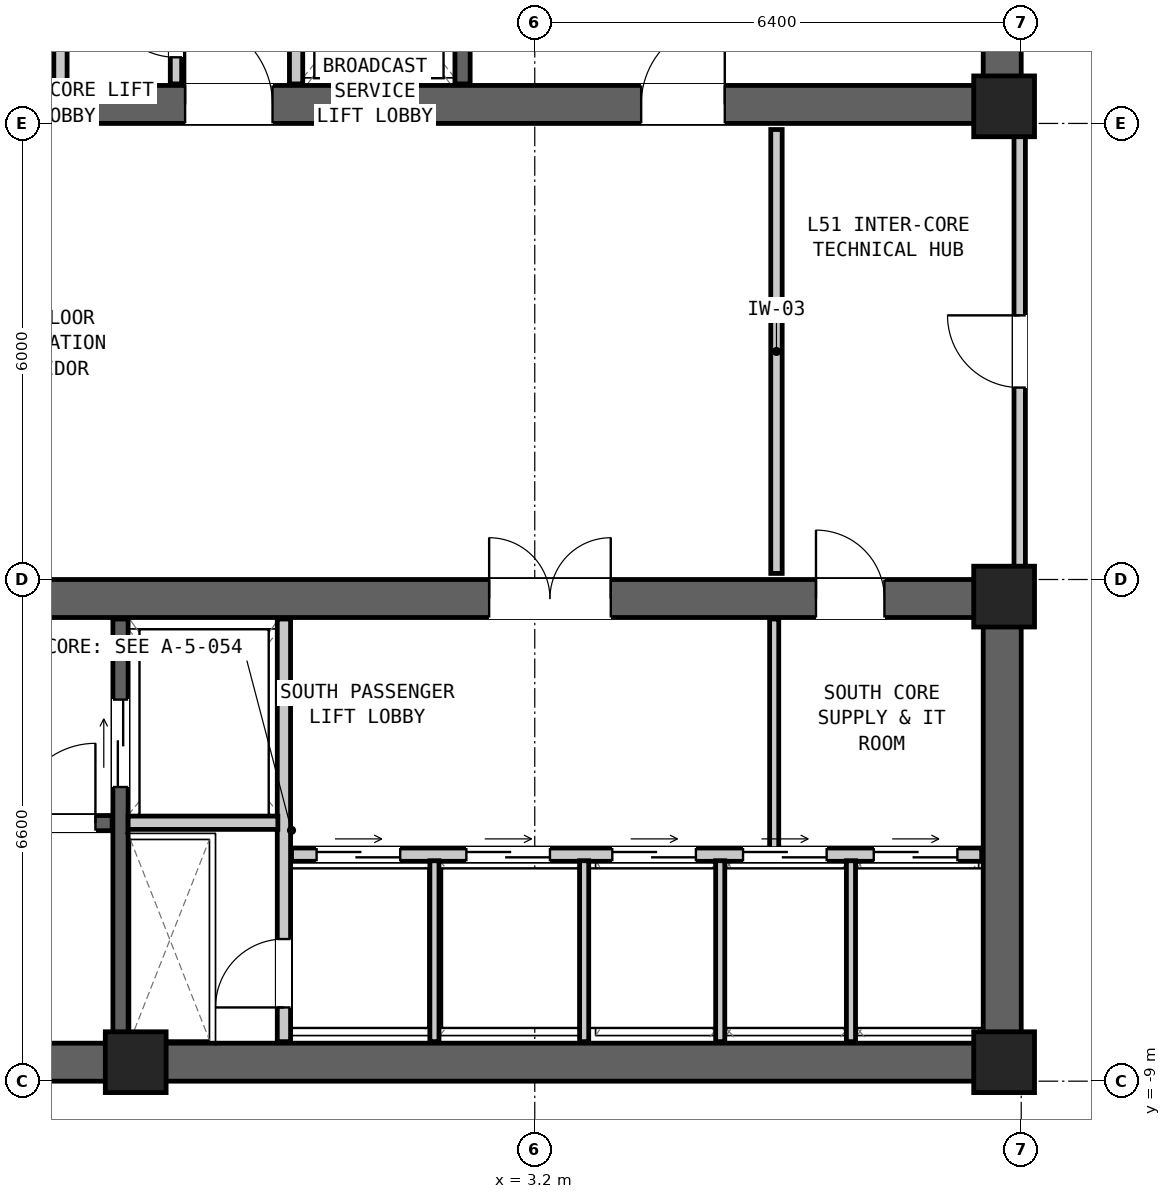
"""IFC4 building model, lengths in metres.
Left out: names, types, materials, properties, quantities, classifications, styles, units other than length and angle.
Written with IfcOpenShell. Run it as: python <this file> out.ifc"""

import sys

from ifc_helpers import new_model, si_unit, direction, frame, frame_2d, origin, origin_2d, place, context, subcontext, project, spatial, rectangle, extrude, element, fill, save


model = new_model("IFC4")
c1 = context("Model", 3, precision=1e-05, world=origin(), true_north=direction((0.0, 1.0)))
c2 = subcontext(c1, "Body", "Model", "MODEL_VIEW")
j1 = project(units=[si_unit("LENGTHUNIT", "METRE"), si_unit("PLANEANGLEUNIT", "RADIAN")], contexts=[c1])
p1 = place(None, origin())
s1 = spatial("IfcSite", under=j1, at=p1, CompositionType="ELEMENT")
p2 = place(p1, origin())
s2 = spatial("IfcBuilding", under=s1, at=p2, CompositionType="ELEMENT")
p3 = place(p2, frame((0.0, 0.0, 174.45)))
s3 = spatial("IfcBuildingStorey", under=s2, at=p3, CompositionType="ELEMENT", Elevation=174.45)
p4 = place(p3, frame((-9.6, 3.85, 0.0), z_axis=(0.0, 0.0, 1.0), x_axis=(1.0, 0.0, 0.0)))
e1 = element("IfcWall", 1, at=p4, inside=s3, PredefinedType="SHEAR", context=c2, shape_type="SweptSolid", body=[
    extrude(rectangle(XDim=19.2, YDim=0.5, at=frame_2d((9.6, 0.0))), origin(), (0.0, 0.0, 1.0), 3.05),
])
p5 = place(p4, frame((14.2, 0.0, 0.0)))
e2 = element("IfcOpeningElement", 2, at=p5, cuts=e1, PredefinedType="OPENING", context=c2, shape_type="SweptSolid", body=[
    extrude(rectangle(XDim=1.1, YDim=2.08, at=frame_2d((0.55, 1.04))), frame((0.0, 0.262, 0.0), z_axis=(0.0, -1.0, 0.0), x_axis=(1.0, 0.0, 0.0)), (0.0, 0.0, 1.0), 0.524),
])
p6 = place(p4, frame((8.2, 0.0, 0.0)))
e3 = element("IfcOpeningElement", 3, at=p6, cuts=e1, PredefinedType="OPENING", context=c2, shape_type="SweptSolid", body=[
    extrude(rectangle(XDim=1.15, YDim=2.1, at=frame_2d((0.575, 1.05))), frame((0.0, 0.262, 0.0), z_axis=(0.0, -1.0, 0.0), x_axis=(1.0, 0.0, 0.0)), (0.0, 0.0, 1.0), 0.524),
])
p7 = place(p4, frame((2.5, 0.0, 0.0)))
e4 = element("IfcOpeningElement", 4, at=p7, cuts=e1, PredefinedType="OPENING", context=c2, shape_type="SweptSolid", body=[
    extrude(rectangle(XDim=1.6, YDim=2.12, at=frame_2d((0.8, 1.06))), frame((0.0, 0.262, 0.0), z_axis=(0.0, -1.0, 0.0), x_axis=(1.0, 0.0, 0.0)), (0.0, 0.0, 1.0), 0.524),
])
p8 = place(p3, frame((9.35, 3.6, 0.0), z_axis=(0.0, 0.0, 1.0), x_axis=(0.0, 1.0, 0.0)))
e5 = element("IfcWall", 5, at=p8, inside=s3, PredefinedType="SHEAR", context=c2, shape_type="SweptSolid", body=[
    extrude(rectangle(XDim=6.6, YDim=0.5, at=frame_2d((3.3, 0.0))), origin(), (0.0, 0.0, 1.0), 3.05),
])
p9 = place(p3, frame((-9.6, -8.75, 0.0), z_axis=(0.0, 0.0, 1.0), x_axis=(1.0, 0.0, 0.0)))
e6 = element("IfcWall", 6, at=p9, inside=s3, PredefinedType="SHEAR", context=c2, shape_type="SweptSolid", body=[
    extrude(rectangle(XDim=19.2, YDim=0.5, at=frame_2d((9.6, 0.0))), origin(), (0.0, 0.0, 1.0), 3.05),
])
p10 = place(p3, frame((-9.6, -2.65, 0.0), z_axis=(0.0, 0.0, 1.0), x_axis=(1.0, 0.0, 0.0)))
e7 = element("IfcWall", 7, at=p10, inside=s3, PredefinedType="SHEAR", context=c2, shape_type="SweptSolid", body=[
    extrude(rectangle(XDim=19.2, YDim=0.5, at=frame_2d((9.6, 0.0))), origin(), (0.0, 0.0, 1.0), 3.05),
])
p11 = place(p10, frame((3.8, 0.0, 0.0)))
e8 = element("IfcOpeningElement", 8, at=p11, cuts=e7, PredefinedType="OPENING", context=c2, shape_type="SweptSolid", body=[
    extrude(rectangle(XDim=1.1, YDim=2.08, at=frame_2d((0.55, 1.04))), frame((0.0, 0.262, 0.0), z_axis=(0.0, -1.0, 0.0), x_axis=(1.0, 0.0, 0.0)), (0.0, 0.0, 1.0), 0.524),
])
p12 = place(p10, frame((12.2, 0.0, 0.0)))
e9 = element("IfcOpeningElement", 9, at=p12, cuts=e7, PredefinedType="OPENING", context=c2, shape_type="SweptSolid", body=[
    extrude(rectangle(XDim=1.6, YDim=2.12, at=frame_2d((0.8, 1.06))), frame((0.0, 0.262, 0.0), z_axis=(0.0, -1.0, 0.0), x_axis=(1.0, 0.0, 0.0)), (0.0, 0.0, 1.0), 0.524),
])
p13 = place(p10, frame((16.5, 0.0, 0.0)))
e10 = element("IfcOpeningElement", 10, at=p13, cuts=e7, PredefinedType="OPENING", context=c2, shape_type="SweptSolid", body=[
    extrude(rectangle(XDim=0.9, YDim=2.05, at=frame_2d((0.45, 1.025))), frame((0.0, 0.262, 0.0), z_axis=(0.0, -1.0, 0.0), x_axis=(1.0, 0.0, 0.0)), (0.0, 0.0, 1.0), 0.524),
])
p14 = place(p3, frame((9.35, -9.0, 0.0), z_axis=(0.0, 0.0, 1.0), x_axis=(0.0, 1.0, 0.0)))
e11 = element("IfcWall", 11, at=p14, inside=s3, PredefinedType="SHEAR", context=c2, shape_type="SweptSolid", body=[
    extrude(rectangle(XDim=6.6, YDim=0.5, at=frame_2d((3.3, 0.0))), origin(), (0.0, 0.0, 1.0), 3.05),
])
for number, where, z_axis, x_axis in (
    (12, (9.375, 3.825, 0.0), (0.0, 0.0, 1.0), (1.0, 0.0, 0.0)),
    (13, (9.375, -2.625, 0.0), (0.0, 0.0, 1.0), (1.0, 0.0, 0.0)),
    (14, (-2.05, -8.75, 0.0), (0.0, 0.0, 1.0), (1.0, 0.0, 0.0)),
    (15, (9.375, -8.75, 0.0), (0.0, 0.0, 1.0), (1.0, 0.0, 0.0)),
):
    element("IfcColumn", number, at=place(p3, frame(where, z_axis=z_axis, x_axis=x_axis)), inside=s3, PredefinedType="COLUMN", context=c2, shape_type="SweptSolid", body=[
        extrude(rectangle(XDim=0.8, YDim=0.8, at=origin_2d()), origin(), (0.0, 0.0, 1.0), 3.05),
    ])
p15 = place(p3, frame((2.25, 4.12, 0.0), z_axis=(0.0, 0.0, 1.0), x_axis=(0.0, 1.0, 0.0)))
e16 = element("IfcWall", 16, at=p15, inside=s3, PredefinedType="SHEAR", context=c2, shape_type="SweptSolid", body=[
    extrude(rectangle(XDim=5.56, YDim=0.2, at=frame_2d((2.78, 0.0))), origin(), (0.0, 0.0, 1.0), 2.83),
])
p16 = place(p15, frame((0.65, 0.0, 0.0)))
e17 = element("IfcOpeningElement", 17, at=p16, cuts=e16, PredefinedType="OPENING", context=c2, shape_type="SweptSolid", body=[
    extrude(rectangle(XDim=1.15, YDim=2.08, at=frame_2d((0.575, 1.04))), frame((0.0, 0.112, 0.0), z_axis=(0.0, -1.0, 0.0), x_axis=(1.0, 0.0, 0.0)), (0.0, 0.0, 1.0), 0.224),
])
p17 = place(p3, frame((0.06, 4.12, 0.0), z_axis=(0.0, 0.0, 1.0), x_axis=(0.0, 1.0, 0.0)))
e18 = element("IfcWall", 18, at=p17, inside=s3, PredefinedType="PARTITIONING", context=c2, shape_type="SweptSolid", body=[
    extrude(rectangle(XDim=5.56, YDim=0.175, at=frame_2d((2.78, 0.0))), origin(), (0.0, 0.0, 1.0), 2.83),
])
p18 = place(p17, frame((3.1, 0.0, 0.0)))
e19 = element("IfcOpeningElement", 19, at=p18, cuts=e18, PredefinedType="OPENING", context=c2, shape_type="SweptSolid", body=[
    extrude(rectangle(XDim=1.4, YDim=2.12, at=frame_2d((0.7, 1.06))), frame((0.0, 0.1, 0.0), z_axis=(0.0, -1.0, 0.0), x_axis=(1.0, 0.0, 0.0)), (0.0, 0.0, 1.0), 0.199),
])
p19 = place(p3, frame((-3.04, 4.12, 0.0), z_axis=(0.0, 0.0, 1.0), x_axis=(0.0, 1.0, 0.0)))
e20 = element("IfcWall", 20, at=p19, inside=s3, PredefinedType="PARTITIONING", context=c2, shape_type="SweptSolid", body=[
    extrude(rectangle(XDim=5.56, YDim=0.175, at=frame_2d((2.78, 0.0))), origin(), (0.0, 0.0, 1.0), 2.83),
])
p20 = place(p3, frame((-1.52, 4.12, 0.0), z_axis=(0.0, 0.0, 1.0), x_axis=(0.0, 1.0, 0.0)))
e21 = element("IfcWall", 21, at=p20, inside=s3, PredefinedType="PARTITIONING", context=c2, shape_type="SweptSolid", body=[
    extrude(rectangle(XDim=5.56, YDim=0.15, at=frame_2d((2.78, 0.0))), origin(), (0.0, 0.0, 1.0), 2.83),
])
p21 = place(p20, frame((3.95, 0.0, 0.0)))
e22 = element("IfcOpeningElement", 22, at=p21, cuts=e21, PredefinedType="OPENING", context=c2, shape_type="SweptSolid", body=[
    extrude(rectangle(XDim=0.9, YDim=2.05, at=frame_2d((0.45, 1.025))), frame((0.0, 0.087, 0.0), z_axis=(0.0, -1.0, 0.0), x_axis=(1.0, 0.0, 0.0)), (0.0, 0.0, 1.0), 0.174),
])
p22 = place(p20, frame((2.2, 0.0, 0.0)))
e23 = element("IfcOpeningElement", 23, at=p22, cuts=e21, PredefinedType="OPENING", context=c2, shape_type="SweptSolid", body=[
    extrude(rectangle(XDim=0.9, YDim=2.05, at=frame_2d((0.45, 1.025))), frame((0.0, 0.087, 0.0), z_axis=(0.0, -1.0, 0.0), x_axis=(1.0, 0.0, 0.0)), (0.0, 0.0, 1.0), 0.174),
])
p23 = place(p20, frame((0.35, 0.0, 0.0)))
e24 = element("IfcOpeningElement", 24, at=p23, cuts=e21, PredefinedType="OPENING", context=c2, shape_type="SweptSolid", body=[
    extrude(rectangle(XDim=0.92, YDim=2.1, at=frame_2d((0.46, 1.05))), frame((0.0, 0.087, 0.0), z_axis=(0.0, -1.0, 0.0), x_axis=(1.0, 0.0, 0.0)), (0.0, 0.0, 1.0), 0.174),
])
p24 = place(p3, frame((-9.08, -5.605, 0.0), z_axis=(0.0, 0.0, 1.0), x_axis=(1.0, 0.0, 0.0)))
e25 = element("IfcWall", 25, at=p24, inside=s3, PredefinedType="SHEAR", context=c2, shape_type="SweptSolid", body=[
    extrude(rectangle(XDim=6.72, YDim=0.2, at=frame_2d((3.36, 0.0))), origin(), (0.0, 0.0, 1.0), 2.83),
])
p25 = place(p24, frame((5.45, 0.0, 0.0)))
e26 = element("IfcOpeningElement", 26, at=p25, cuts=e25, PredefinedType="OPENING", context=c2, shape_type="SweptSolid", body=[
    extrude(rectangle(XDim=1.05, YDim=2.08, at=frame_2d((0.525, 1.04))), frame((0.0, 0.112, 0.0), z_axis=(0.0, -1.0, 0.0), x_axis=(1.0, 0.0, 0.0)), (0.0, 0.0, 1.0), 0.224),
])
p26 = place(p3, frame((-2.25, -8.48, 0.0), z_axis=(0.0, 0.0, 1.0), x_axis=(0.0, 1.0, 0.0)))
e27 = element("IfcWall", 27, at=p26, inside=s3, PredefinedType="SHEAR", context=c2, shape_type="SweptSolid", body=[
    extrude(rectangle(XDim=5.56, YDim=0.2, at=frame_2d((2.78, 0.0))), origin(), (0.0, 0.0, 1.0), 2.83),
])
p27 = place(p26, frame((3.35, 0.0, 0.0)))
e28 = element("IfcOpeningElement", 28, at=p27, cuts=e27, PredefinedType="OPENING", context=c2, shape_type="SweptSolid", body=[
    extrude(rectangle(XDim=1.15, YDim=2.08, at=frame_2d((0.575, 1.04))), frame((0.0, 0.112, 0.0), z_axis=(0.0, -1.0, 0.0), x_axis=(1.0, 0.0, 0.0)), (0.0, 0.0, 1.0), 0.224),
])
p28 = place(p3, frame((-0.1, -8.48, 0.0), z_axis=(0.0, 0.0, 1.0), x_axis=(0.0, 1.0, 0.0)))
e29 = element("IfcWall", 29, at=p28, inside=s3, PredefinedType="PARTITIONING", context=c2, shape_type="SweptSolid", body=[
    extrude(rectangle(XDim=5.56, YDim=0.175, at=frame_2d((2.78, 0.0))), origin(), (0.0, 0.0, 1.0), 2.83),
])
p29 = place(p28, frame((0.45, 0.0, 0.0)))
e30 = element("IfcOpeningElement", 30, at=p29, cuts=e29, PredefinedType="OPENING", context=c2, shape_type="SweptSolid", body=[
    extrude(rectangle(XDim=0.9, YDim=2.05, at=frame_2d((0.45, 1.025))), frame((0.0, 0.1, 0.0), z_axis=(0.0, -1.0, 0.0), x_axis=(1.0, 0.0, 0.0)), (0.0, 0.0, 1.0), 0.199),
])
p30 = place(p3, frame((-2.15, -5.6, 0.0), z_axis=(0.0, 0.0, 1.0), x_axis=(1.0, 0.0, 0.0)))
e31 = element("IfcWall", 31, at=p30, inside=s3, PredefinedType="PARTITIONING", context=c2, shape_type="SweptSolid", body=[
    extrude(rectangle(XDim=1.97, YDim=0.175, at=frame_2d((0.985, 0.0))), origin(), (0.0, 0.0, 1.0), 2.83),
])
p31 = place(p3, frame((0.0, -6.02, 0.0), z_axis=(0.0, 0.0, 1.0), x_axis=(1.0, 0.0, 0.0)))
e32 = element("IfcWall", 32, at=p31, inside=s3, PredefinedType="PARTITIONING", context=c2, shape_type="SweptSolid", body=[
    extrude(rectangle(XDim=9.08, YDim=0.175, at=frame_2d((4.54, 0.0))), origin(), (0.0, 0.0, 1.0), 2.83),
])
p32 = place(p31, frame((0.33, 0.0, 0.0)))
e33 = element("IfcOpeningElement", 33, at=p32, cuts=e32, PredefinedType="OPENING", context=c2, shape_type="SweptSolid", body=[
    extrude(rectangle(XDim=1.1, YDim=2.06, at=frame_2d((0.55, 1.03))), frame((0.0, 0.1, 0.0), z_axis=(0.0, -1.0, 0.0), x_axis=(1.0, 0.0, 0.0)), (0.0, 0.0, 1.0), 0.199),
])
p33 = place(p31, frame((2.3, 0.0, 0.0)))
e34 = element("IfcOpeningElement", 34, at=p33, cuts=e32, PredefinedType="OPENING", context=c2, shape_type="SweptSolid", body=[
    extrude(rectangle(XDim=1.1, YDim=2.06, at=frame_2d((0.55, 1.03))), frame((0.0, 0.1, 0.0), z_axis=(0.0, -1.0, 0.0), x_axis=(1.0, 0.0, 0.0)), (0.0, 0.0, 1.0), 0.199),
])
p34 = place(p31, frame((4.22, 0.0, 0.0)))
e35 = element("IfcOpeningElement", 35, at=p34, cuts=e32, PredefinedType="OPENING", context=c2, shape_type="SweptSolid", body=[
    extrude(rectangle(XDim=1.1, YDim=2.06, at=frame_2d((0.55, 1.03))), frame((0.0, 0.1, 0.0), z_axis=(0.0, -1.0, 0.0), x_axis=(1.0, 0.0, 0.0)), (0.0, 0.0, 1.0), 0.199),
])
p35 = place(p31, frame((5.94, 0.0, 0.0)))
e36 = element("IfcOpeningElement", 36, at=p35, cuts=e32, PredefinedType="OPENING", context=c2, shape_type="SweptSolid", body=[
    extrude(rectangle(XDim=1.1, YDim=2.06, at=frame_2d((0.55, 1.03))), frame((0.0, 0.1, 0.0), z_axis=(0.0, -1.0, 0.0), x_axis=(1.0, 0.0, 0.0)), (0.0, 0.0, 1.0), 0.199),
])
p36 = place(p31, frame((7.66, 0.0, 0.0)))
e37 = element("IfcOpeningElement", 37, at=p36, cuts=e32, PredefinedType="OPENING", context=c2, shape_type="SweptSolid", body=[
    extrude(rectangle(XDim=1.1, YDim=2.06, at=frame_2d((0.55, 1.03))), frame((0.0, 0.1, 0.0), z_axis=(0.0, -1.0, 0.0), x_axis=(1.0, 0.0, 0.0)), (0.0, 0.0, 1.0), 0.199),
])
for number, where, z_axis, x_axis in (
    (38, (1.88, -8.48, 0.0), (0.0, 0.0, 1.0), (0.0, 1.0, 0.0)),
    (39, (3.85, -8.48, 0.0), (0.0, 0.0, 1.0), (0.0, 1.0, 0.0)),
    (40, (5.64, -8.48, 0.0), (0.0, 0.0, 1.0), (0.0, 1.0, 0.0)),
    (41, (7.36, -8.48, 0.0), (0.0, 0.0, 1.0), (0.0, 1.0, 0.0)),
):
    element("IfcWall", number, at=place(p3, frame(where, z_axis=z_axis, x_axis=x_axis)), inside=s3, PredefinedType="PARTITIONING", context=c2, shape_type="SweptSolid", body=[
        extrude(rectangle(XDim=2.38, YDim=0.12, at=frame_2d((1.19, 0.0))), origin(), (0.0, 0.0, 1.0), 2.83),
    ])
p37 = place(p3, frame((6.35, -5.94, 0.0), z_axis=(0.0, 0.0, 1.0), x_axis=(0.0, 1.0, 0.0)))
e42 = element("IfcWall", 42, at=p37, inside=s3, PredefinedType="PARTITIONING", context=c2, shape_type="SweptSolid", body=[
    extrude(rectangle(XDim=3.02, YDim=0.12, at=frame_2d((1.51, 0.0))), origin(), (0.0, 0.0, 1.0), 2.83),
])
p38 = place(p3, frame((6.38, -2.32, 0.0), z_axis=(0.0, 0.0, 1.0), x_axis=(0.0, 1.0, 0.0)))
e43 = element("IfcWall", 43, at=p38, inside=s3, PredefinedType="PARTITIONING", context=c2, shape_type="SweptSolid", body=[
    extrude(rectangle(XDim=5.84, YDim=0.15, at=frame_2d((2.92, 0.0))), origin(), (0.0, 0.0, 1.0), 2.198),
])
p39 = place(p3, frame((9.58, -2.32, 0.0), z_axis=(0.0, 0.0, 1.0), x_axis=(0.0, 1.0, 0.0)))
e44 = element("IfcWall", 44, at=p39, inside=s3, PredefinedType="PARTITIONING", context=c2, shape_type="SweptSolid", body=[
    extrude(rectangle(XDim=5.84, YDim=0.15, at=frame_2d((2.92, 0.0))), origin(), (0.0, 0.0, 1.0), 2.198),
])
p40 = place(p39, frame((2.445, 0.0, 0.0)))
e45 = element("IfcOpeningElement", 45, at=p40, cuts=e44, PredefinedType="OPENING", context=c2, shape_type="SweptSolid", body=[
    extrude(rectangle(XDim=0.95, YDim=2.1, at=frame_2d((0.475, 1.05))), frame((0.0, 0.087, 0.0), z_axis=(0.0, -1.0, 0.0), x_axis=(1.0, 0.0, 0.0)), (0.0, 0.0, 1.0), 0.174),
])
p41 = place(p5, origin())
e46 = element("IfcDoor", 46, at=p41, inside=s3, OperationType="SINGLE_SWING_RIGHT", PredefinedType="DOOR", context=c2, shape_type="SweptSolid", body=[
    extrude(rectangle(XDim=1.1, YDim=2.08, at=frame_2d((0.55, 1.04))), frame((0.0, 0.025, 0.0), z_axis=(0.0, -1.0, 0.0), x_axis=(1.0, 0.0, 0.0)), (0.0, 0.0, 1.0), 0.05),
])
fill(e2, e46)
p42 = place(p6, origin())
e47 = element("IfcDoor", 47, at=p42, inside=s3, OperationType="SINGLE_SWING_LEFT", PredefinedType="DOOR", context=c2, shape_type="SweptSolid", body=[
    extrude(rectangle(XDim=1.15, YDim=2.1, at=frame_2d((0.575, 1.05))), frame((0.0, 0.025, 0.0), z_axis=(0.0, -1.0, 0.0), x_axis=(1.0, 0.0, 0.0)), (0.0, 0.0, 1.0), 0.05),
])
fill(e3, e47)
p43 = place(p23, origin())
e48 = element("IfcDoor", 48, at=p43, inside=s3, OperationType="SINGLE_SWING_RIGHT", PredefinedType="DOOR", context=c2, shape_type="SweptSolid", body=[
    extrude(rectangle(XDim=0.92, YDim=2.1, at=frame_2d((0.46, 1.05))), frame((0.0, 0.025, 0.0), z_axis=(0.0, -1.0, 0.0), x_axis=(1.0, 0.0, 0.0)), (0.0, 0.0, 1.0), 0.05),
])
fill(e24, e48)
p44 = place(p25, origin())
e49 = element("IfcDoor", 49, at=p44, inside=s3, OperationType="SINGLE_SWING_RIGHT", PredefinedType="DOOR", context=c2, shape_type="SweptSolid", body=[
    extrude(rectangle(XDim=1.05, YDim=2.08, at=frame_2d((0.525, 1.04))), frame((0.0, 0.025, 0.0), z_axis=(0.0, -1.0, 0.0), x_axis=(1.0, 0.0, 0.0)), (0.0, 0.0, 1.0), 0.05),
])
fill(e26, e49)
p45 = place(p27, origin())
e50 = element("IfcDoor", 50, at=p45, inside=s3, OperationType="DOUBLE_DOOR_SLIDING", PredefinedType="DOOR", context=c2, shape_type="SweptSolid", body=[
    extrude(rectangle(XDim=1.15, YDim=2.08, at=frame_2d((0.575, 1.04))), frame((0.0, 0.025, 0.0), z_axis=(0.0, -1.0, 0.0), x_axis=(1.0, 0.0, 0.0)), (0.0, 0.0, 1.0), 0.05),
])
fill(e28, e50)
p46 = place(p29, origin())
e51 = element("IfcDoor", 51, at=p46, inside=s3, OperationType="SINGLE_SWING_LEFT", PredefinedType="DOOR", context=c2, shape_type="SweptSolid", body=[
    extrude(rectangle(XDim=0.9, YDim=2.05, at=frame_2d((0.45, 1.025))), frame((0.0, 0.025, 0.0), z_axis=(0.0, -1.0, 0.0), x_axis=(1.0, 0.0, 0.0)), (0.0, 0.0, 1.0), 0.05),
])
fill(e30, e51)
p47 = place(p32, origin())
e52 = element("IfcDoor", 52, at=p47, inside=s3, OperationType="DOUBLE_DOOR_SLIDING", PredefinedType="DOOR", context=c2, shape_type="SweptSolid", body=[
    extrude(rectangle(XDim=1.1, YDim=2.06, at=frame_2d((0.55, 1.03))), frame((0.0, 0.025, 0.0), z_axis=(0.0, -1.0, 0.0), x_axis=(1.0, 0.0, 0.0)), (0.0, 0.0, 1.0), 0.05),
])
fill(e33, e52)
p48 = place(p33, origin())
e53 = element("IfcDoor", 53, at=p48, inside=s3, OperationType="DOUBLE_DOOR_SLIDING", PredefinedType="DOOR", context=c2, shape_type="SweptSolid", body=[
    extrude(rectangle(XDim=1.1, YDim=2.06, at=frame_2d((0.55, 1.03))), frame((0.0, 0.025, 0.0), z_axis=(0.0, -1.0, 0.0), x_axis=(1.0, 0.0, 0.0)), (0.0, 0.0, 1.0), 0.05),
])
fill(e34, e53)
p49 = place(p12, origin())
e54 = element("IfcDoor", 54, at=p49, inside=s3, OperationType="DOUBLE_DOOR_SINGLE_SWING", PredefinedType="DOOR", context=c2, shape_type="SweptSolid", body=[
    extrude(rectangle(XDim=1.6, YDim=2.12, at=frame_2d((0.8, 1.06))), frame((0.0, 0.025, 0.0), z_axis=(0.0, -1.0, 0.0), x_axis=(1.0, 0.0, 0.0)), (0.0, 0.0, 1.0), 0.05),
])
fill(e9, e54)
p50 = place(p13, origin())
e55 = element("IfcDoor", 55, at=p50, inside=s3, OperationType="SINGLE_SWING_LEFT", PredefinedType="DOOR", context=c2, shape_type="SweptSolid", body=[
    extrude(rectangle(XDim=0.9, YDim=2.05, at=frame_2d((0.45, 1.025))), frame((0.0, 0.025, 0.0), z_axis=(0.0, -1.0, 0.0), x_axis=(1.0, 0.0, 0.0)), (0.0, 0.0, 1.0), 0.05),
])
fill(e10, e55)
p51 = place(p40, origin())
e56 = element("IfcDoor", 56, at=p51, inside=s3, OperationType="SINGLE_SWING_RIGHT", PredefinedType="DOOR", context=c2, shape_type="SweptSolid", body=[
    extrude(rectangle(XDim=0.95, YDim=2.1, at=frame_2d((0.475, 1.05))), frame((0.0, 0.025, 0.0), z_axis=(0.0, -1.0, 0.0), x_axis=(1.0, 0.0, 0.0)), (0.0, 0.0, 1.0), 0.05),
])
fill(e45, e56)
p52 = place(p34, origin())
e57 = element("IfcDoor", 57, at=p52, inside=s3, OperationType="DOUBLE_DOOR_SLIDING", PredefinedType="DOOR", context=c2, shape_type="SweptSolid", body=[
    extrude(rectangle(XDim=1.1, YDim=2.06, at=frame_2d((0.55, 1.03))), frame((0.0, 0.025, 0.0), z_axis=(0.0, -1.0, 0.0), x_axis=(1.0, 0.0, 0.0)), (0.0, 0.0, 1.0), 0.05),
])
fill(e35, e57)
p53 = place(p35, origin())
e58 = element("IfcDoor", 58, at=p53, inside=s3, OperationType="DOUBLE_DOOR_SLIDING", PredefinedType="DOOR", context=c2, shape_type="SweptSolid", body=[
    extrude(rectangle(XDim=1.1, YDim=2.06, at=frame_2d((0.55, 1.03))), frame((0.0, 0.025, 0.0), z_axis=(0.0, -1.0, 0.0), x_axis=(1.0, 0.0, 0.0)), (0.0, 0.0, 1.0), 0.05),
])
fill(e36, e58)
p54 = place(p36, origin())
e59 = element("IfcDoor", 59, at=p54, inside=s3, OperationType="DOUBLE_DOOR_SLIDING", PredefinedType="DOOR", context=c2, shape_type="SweptSolid", body=[
    extrude(rectangle(XDim=1.1, YDim=2.06, at=frame_2d((0.55, 1.03))), frame((0.0, 0.025, 0.0), z_axis=(0.0, -1.0, 0.0), x_axis=(1.0, 0.0, 0.0)), (0.0, 0.0, 1.0), 0.05),
])
fill(e37, e59)
save(model, sys.argv[1])
